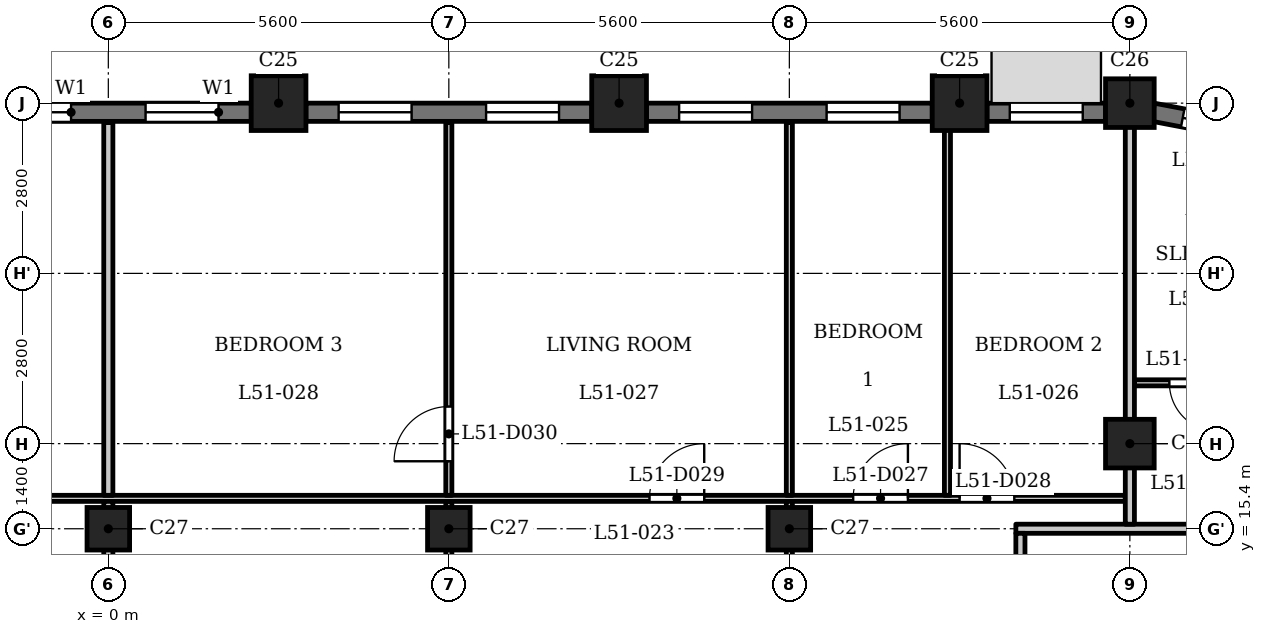
"""IFC4 building model, lengths in metres.
Left out: names, types, materials, properties, quantities, classifications, styles, units other than length and angle.
Written with IfcOpenShell. Run it as: python <this file> out.ifc"""

import sys

from ifc_helpers import new_model, si_unit, direction, frame, frame_2d, origin, origin_2d, place, context, subcontext, project, spatial, rectangle, extrude, element, fill, save


model = new_model("IFC4")
c1 = context("Model", 3, precision=1e-05, world=origin(), true_north=direction((0.0, 1.0)))
c2 = subcontext(c1, "Body", "Model", "MODEL_VIEW")
j1 = project(units=[si_unit("LENGTHUNIT", "METRE"), si_unit("PLANEANGLEUNIT", "RADIAN")], contexts=[c1])
p1 = place(None, origin())
s1 = spatial("IfcSite", under=j1, at=p1, CompositionType="ELEMENT")
p2 = place(p1, origin())
s2 = spatial("IfcBuilding", under=s1, at=p2, CompositionType="ELEMENT")
p3 = place(p2, frame((0.0, 0.0, 199.4)))
s3 = spatial("IfcBuildingStorey", under=s2, at=p3, CompositionType="ELEMENT", Elevation=199.4)
for number, where, z_axis, x_axis in (
    (1, (14.0, 22.4, 0.0), (0.0, 0.0, 1.0), (1.0, 0.0, 0.0)),
    (2, (8.4, 22.4, 0.0), (0.0, 0.0, 1.0), (1.0, 0.0, 0.0)),
    (3, (2.8, 22.4, 0.0), (0.0, 0.0, 1.0), (1.0, 0.0, 0.0)),
):
    element("IfcColumn", number, at=place(p3, frame(where, z_axis=z_axis, x_axis=x_axis)), inside=s3, PredefinedType="COLUMN", context=c2, shape_type="SweptSolid", body=[
        extrude(rectangle(XDim=0.9, YDim=0.9, at=origin_2d()), origin(), (0.0, 0.0, 1.0), 3.5),
    ])
for number, where, z_axis, x_axis in (
    (4, (16.8, 16.8, 0.0), (0.0, 0.0, 1.0), (1.0, 0.0, 0.0)),
    (5, (16.8, 22.4, 0.0), (0.0, 0.0, 1.0), (1.0, 0.0, 0.0)),
):
    element("IfcColumn", number, at=place(p3, frame(where, z_axis=z_axis, x_axis=x_axis)), inside=s3, PredefinedType="COLUMN", context=c2, shape_type="SweptSolid", body=[
        extrude(rectangle(XDim=0.8, YDim=0.8, at=origin_2d()), origin(), (0.0, 0.0, 1.0), 3.5),
    ])
for number, where, z_axis, x_axis in (
    (6, (0.0, 15.4, 0.0), (0.0, 0.0, 1.0), (1.0, 0.0, 0.0)),
    (7, (5.6, 15.4, 0.0), (0.0, 0.0, 1.0), (1.0, 0.0, 0.0)),
    (8, (11.2, 15.4, 0.0), (0.0, 0.0, 1.0), (1.0, 0.0, 0.0)),
):
    element("IfcColumn", number, at=place(p3, frame(where, z_axis=z_axis, x_axis=x_axis)), inside=s3, PredefinedType="COLUMN", context=c2, shape_type="SweptSolid", body=[
        extrude(rectangle(XDim=0.7, YDim=0.7, at=origin_2d()), origin(), (0.0, 0.0, 1.0), 3.5),
    ])
p4 = place(p3, frame((18.946, 21.914, 0.0), z_axis=(0.0, 0.0, 1.0), x_axis=(-0.98230529033, 0.187286722942, 0.0)))
e9 = element("IfcWall", 9, at=p4, inside=s3, PredefinedType="SOLIDWALL", context=c2, shape_type="SweptSolid", body=[
    extrude(rectangle(XDim=1.799, YDim=0.3, at=frame_2d((0.899, 0.0))), origin(), (0.0, 0.0, 1.0), 2.5),
])
p5 = place(p4, frame((0.5, 0.0, 0.6)))
e10 = element("IfcOpeningElement", 10, at=p5, cuts=e9, PredefinedType="OPENING", context=c2, shape_type="SweptSolid", body=[
    extrude(rectangle(XDim=0.8, YDim=1.55, at=frame_2d((0.4, 0.775))), frame((0.0, 0.16, 0.0), z_axis=(0.0, -1.0, 0.0), x_axis=(1.0, 0.0, 0.0)), (0.0, 0.0, 1.0), 0.32),
])
p6 = place(p3, frame((16.4, 22.25, 0.0), z_axis=(0.0, 0.0, 1.0), x_axis=(-1.0, 0.0, 0.0)))
e11 = element("IfcWall", 11, at=p6, inside=s3, PredefinedType="SOLIDWALL", context=c2, shape_type="SweptSolid", body=[
    extrude(rectangle(XDim=1.95, YDim=0.3, at=frame_2d((0.975, 0.0))), origin(), (0.0, 0.0, 1.0), 2.5),
])
p7 = place(p6, frame((0.375, 0.0, 0.6)))
e12 = element("IfcOpeningElement", 12, at=p7, cuts=e11, PredefinedType="OPENING", context=c2, shape_type="SweptSolid", body=[
    extrude(rectangle(XDim=1.2, YDim=1.55, at=frame_2d((0.6, 0.775))), frame((0.0, 0.16, 0.0), z_axis=(0.0, -1.0, 0.0), x_axis=(1.0, 0.0, 0.0)), (0.0, 0.0, 1.0), 0.32),
])
p8 = place(p3, frame((13.55, 22.25, 0.0), z_axis=(0.0, 0.0, 1.0), x_axis=(-1.0, 0.0, 0.0)))
e13 = element("IfcWall", 13, at=p8, inside=s3, PredefinedType="SOLIDWALL", context=c2, shape_type="SweptSolid", body=[
    extrude(rectangle(XDim=4.7, YDim=0.3, at=frame_2d((2.35, 0.0))), origin(), (0.0, 0.0, 1.0), 2.5),
])
p9 = place(p8, frame((0.538, 0.0, 0.6)))
e14 = element("IfcOpeningElement", 14, at=p9, cuts=e13, PredefinedType="OPENING", context=c2, shape_type="SweptSolid", body=[
    extrude(rectangle(XDim=1.2, YDim=1.55, at=frame_2d((0.6, 0.775))), frame((0.0, 0.16, 0.0), z_axis=(0.0, -1.0, 0.0), x_axis=(1.0, 0.0, 0.0)), (0.0, 0.0, 1.0), 0.32),
])
p10 = place(p8, frame((2.962, 0.0, 0.6)))
e15 = element("IfcOpeningElement", 15, at=p10, cuts=e13, PredefinedType="OPENING", context=c2, shape_type="SweptSolid", body=[
    extrude(rectangle(XDim=1.2, YDim=1.55, at=frame_2d((0.6, 0.775))), frame((0.0, 0.16, 0.0), z_axis=(0.0, -1.0, 0.0), x_axis=(1.0, 0.0, 0.0)), (0.0, 0.0, 1.0), 0.32),
])
p11 = place(p3, frame((7.95, 22.25, 0.0), z_axis=(0.0, 0.0, 1.0), x_axis=(-1.0, 0.0, 0.0)))
e16 = element("IfcWall", 16, at=p11, inside=s3, PredefinedType="SOLIDWALL", context=c2, shape_type="SweptSolid", body=[
    extrude(rectangle(XDim=4.7, YDim=0.3, at=frame_2d((2.35, 0.0))), origin(), (0.0, 0.0, 1.0), 2.5),
])
p12 = place(p11, frame((0.538, 0.0, 0.6)))
e17 = element("IfcOpeningElement", 17, at=p12, cuts=e16, PredefinedType="OPENING", context=c2, shape_type="SweptSolid", body=[
    extrude(rectangle(XDim=1.2, YDim=1.55, at=frame_2d((0.6, 0.775))), frame((0.0, 0.16, 0.0), z_axis=(0.0, -1.0, 0.0), x_axis=(1.0, 0.0, 0.0)), (0.0, 0.0, 1.0), 0.32),
])
p13 = place(p11, frame((2.962, 0.0, 0.6)))
e18 = element("IfcOpeningElement", 18, at=p13, cuts=e16, PredefinedType="OPENING", context=c2, shape_type="SweptSolid", body=[
    extrude(rectangle(XDim=1.2, YDim=1.55, at=frame_2d((0.6, 0.775))), frame((0.0, 0.16, 0.0), z_axis=(0.0, -1.0, 0.0), x_axis=(1.0, 0.0, 0.0)), (0.0, 0.0, 1.0), 0.32),
])
p14 = place(p3, frame((2.35, 22.25, 0.0), z_axis=(0.0, 0.0, 1.0), x_axis=(-1.0, 0.0, 0.0)))
e19 = element("IfcWall", 19, at=p14, inside=s3, PredefinedType="SOLIDWALL", context=c2, shape_type="SweptSolid", body=[
    extrude(rectangle(XDim=4.7, YDim=0.3, at=frame_2d((2.35, 0.0))), origin(), (0.0, 0.0, 1.0), 2.5),
])
p15 = place(p14, frame((0.538, 0.0, 0.6)))
e20 = element("IfcOpeningElement", 20, at=p15, cuts=e19, PredefinedType="OPENING", context=c2, shape_type="SweptSolid", body=[
    extrude(rectangle(XDim=1.2, YDim=1.55, at=frame_2d((0.6, 0.775))), frame((0.0, 0.16, 0.0), z_axis=(0.0, -1.0, 0.0), x_axis=(1.0, 0.0, 0.0)), (0.0, 0.0, 1.0), 0.32),
])
p16 = place(p14, frame((2.962, 0.0, 0.6)))
e21 = element("IfcOpeningElement", 21, at=p16, cuts=e19, PredefinedType="OPENING", context=c2, shape_type="SweptSolid", body=[
    extrude(rectangle(XDim=1.2, YDim=1.55, at=frame_2d((0.6, 0.775))), frame((0.0, 0.16, 0.0), z_axis=(0.0, -1.0, 0.0), x_axis=(1.0, 0.0, 0.0)), (0.0, 0.0, 1.0), 0.32),
])
p17 = place(p3, frame((14.925, 15.4, 0.0), z_axis=(0.0, 0.0, 1.0), x_axis=(1.0, 0.0, 0.0)))
e22 = element("IfcWall", 22, at=p17, inside=s3, PredefinedType="PARTITIONING", context=c2, shape_type="SweptSolid", body=[
    extrude(rectangle(XDim=9.759, YDim=0.15, at=frame_2d((4.879, 0.0))), origin(), (0.0, 0.0, 1.0), 3.2),
])
p18 = place(p17, frame((7.616, 0.0, 0.0)))
e23 = element("IfcOpeningElement", 23, at=p18, cuts=e22, PredefinedType="OPENING", context=c2, shape_type="SweptSolid", body=[
    extrude(rectangle(XDim=1.0, YDim=2.1, at=frame_2d((0.5, 1.05))), frame((0.0, 0.085, 0.0), z_axis=(0.0, -1.0, 0.0), x_axis=(1.0, 0.0, 0.0)), (0.0, 0.0, 1.0), 0.17),
])
p19 = place(p3, frame((-16.725, 15.9, 0.0), z_axis=(0.0, 0.0, 1.0), x_axis=(1.0, 0.0, 0.0)))
e24 = element("IfcWall", 24, at=p19, inside=s3, PredefinedType="PARTITIONING", context=c2, shape_type="SweptSolid", body=[
    extrude(rectangle(XDim=33.45, YDim=0.1, at=frame_2d((16.725, 0.0))), origin(), (0.0, 0.0, 1.0), 3.2),
])
p20 = place(p19, frame((1.875, 0.0, 0.0)))
e25 = element("IfcOpeningElement", 25, at=p20, cuts=e24, PredefinedType="OPENING", context=c2, shape_type="SweptSolid", body=[
    extrude(rectangle(XDim=0.9, YDim=2.1, at=frame_2d((0.45, 1.05))), frame((0.0, 0.06, 0.0), z_axis=(0.0, -1.0, 0.0), x_axis=(1.0, 0.0, 0.0)), (0.0, 0.0, 1.0), 0.12),
])
p21 = place(p19, frame((3.975, 0.0, 0.0)))
e26 = element("IfcOpeningElement", 26, at=p21, cuts=e24, PredefinedType="OPENING", context=c2, shape_type="SweptSolid", body=[
    extrude(rectangle(XDim=0.9, YDim=2.1, at=frame_2d((0.45, 1.05))), frame((0.0, 0.06, 0.0), z_axis=(0.0, -1.0, 0.0), x_axis=(1.0, 0.0, 0.0)), (0.0, 0.0, 1.0), 0.12),
])
p22 = place(p19, frame((6.825, 0.0, 0.0)))
e27 = element("IfcOpeningElement", 27, at=p22, cuts=e24, PredefinedType="OPENING", context=c2, shape_type="SweptSolid", body=[
    extrude(rectangle(XDim=0.9, YDim=2.1, at=frame_2d((0.45, 1.05))), frame((0.0, 0.06, 0.0), z_axis=(0.0, -1.0, 0.0), x_axis=(1.0, 0.0, 0.0)), (0.0, 0.0, 1.0), 0.12),
])
p23 = place(p19, frame((28.975, 0.0, 0.0)))
e28 = element("IfcOpeningElement", 28, at=p23, cuts=e24, PredefinedType="OPENING", context=c2, shape_type="SweptSolid", body=[
    extrude(rectangle(XDim=0.9, YDim=2.1, at=frame_2d((0.45, 1.05))), frame((0.0, 0.06, 0.0), z_axis=(0.0, -1.0, 0.0), x_axis=(1.0, 0.0, 0.0)), (0.0, 0.0, 1.0), 0.12),
])
p24 = place(p19, frame((30.725, 0.0, 0.0)))
e29 = element("IfcOpeningElement", 29, at=p24, cuts=e24, PredefinedType="OPENING", context=c2, shape_type="SweptSolid", body=[
    extrude(rectangle(XDim=0.9, YDim=2.1, at=frame_2d((0.45, 1.05))), frame((0.0, 0.06, 0.0), z_axis=(0.0, -1.0, 0.0), x_axis=(1.0, 0.0, 0.0)), (0.0, 0.0, 1.0), 0.12),
])
p25 = place(p19, frame((25.625, 0.0, 0.0)))
e30 = element("IfcOpeningElement", 30, at=p25, cuts=e24, PredefinedType="OPENING", context=c2, shape_type="SweptSolid", body=[
    extrude(rectangle(XDim=0.9, YDim=2.1, at=frame_2d((0.45, 1.05))), frame((0.0, 0.06, 0.0), z_axis=(0.0, -1.0, 0.0), x_axis=(1.0, 0.0, 0.0)), (0.0, 0.0, 1.0), 0.12),
])
p26 = place(p3, frame((16.875, 17.8, 0.0), z_axis=(0.0, 0.0, 1.0), x_axis=(1.0, 0.0, 0.0)))
e31 = element("IfcWall", 31, at=p26, inside=s3, PredefinedType="PARTITIONING", context=c2, shape_type="SweptSolid", body=[
    extrude(rectangle(XDim=6.719, YDim=0.1, at=frame_2d((3.359, 0.0))), origin(), (0.0, 0.0, 1.0), 3.2),
])
p27 = place(p26, frame((0.575, 0.0, 0.0)))
e32 = element("IfcOpeningElement", 32, at=p27, cuts=e31, PredefinedType="OPENING", context=c2, shape_type="SweptSolid", body=[
    extrude(rectangle(XDim=0.8, YDim=2.1, at=frame_2d((0.4, 1.05))), frame((0.0, 0.06, 0.0), z_axis=(0.0, -1.0, 0.0), x_axis=(1.0, 0.0, 0.0)), (0.0, 0.0, 1.0), 0.12),
])
p28 = place(p26, frame((4.693, 0.0, 0.0)))
e33 = element("IfcOpeningElement", 33, at=p28, cuts=e31, PredefinedType="OPENING", context=c2, shape_type="SweptSolid", body=[
    extrude(rectangle(XDim=0.9, YDim=2.1, at=frame_2d((0.45, 1.05))), frame((0.0, 0.06, 0.0), z_axis=(0.0, -1.0, 0.0), x_axis=(1.0, 0.0, 0.0)), (0.0, 0.0, 1.0), 0.12),
])
p29 = place(p3, frame((0.0, 13.275, 0.0), z_axis=(0.0, 0.0, 1.0), x_axis=(0.0, 1.0, 0.0)))
e34 = element("IfcWall", 34, at=p29, inside=s3, PredefinedType="PARTITIONING", context=c2, shape_type="SweptSolid", body=[
    extrude(rectangle(XDim=2.575, YDim=0.15, at=frame_2d((1.288, 0.0))), origin(), (0.0, 0.0, 1.0), 3.2),
])
p30 = place(p3, frame((0.0, 15.95, 0.0), z_axis=(0.0, 0.0, 1.0), x_axis=(0.0, 1.0, 0.0)))
e35 = element("IfcWall", 35, at=p30, inside=s3, PredefinedType="PARTITIONING", context=c2, shape_type="SweptSolid", body=[
    extrude(rectangle(XDim=6.13, YDim=0.15, at=frame_2d((3.065, 0.0))), origin(), (0.0, 0.0, 1.0), 3.2),
])
p31 = place(p3, frame((5.6, 13.275, 0.0), z_axis=(0.0, 0.0, 1.0), x_axis=(0.0, 1.0, 0.0)))
e36 = element("IfcWall", 36, at=p31, inside=s3, PredefinedType="PARTITIONING", context=c2, shape_type="SweptSolid", body=[
    extrude(rectangle(XDim=2.575, YDim=0.1, at=frame_2d((1.288, 0.0))), origin(), (0.0, 0.0, 1.0), 3.2),
])
p32 = place(p31, frame((0.425, 0.0, 0.0)))
e37 = element("IfcOpeningElement", 37, at=p32, cuts=e36, PredefinedType="OPENING", context=c2, shape_type="SweptSolid", body=[
    extrude(rectangle(XDim=0.8, YDim=2.1, at=frame_2d((0.4, 1.05))), frame((0.0, 0.06, 0.0), z_axis=(0.0, -1.0, 0.0), x_axis=(1.0, 0.0, 0.0)), (0.0, 0.0, 1.0), 0.12),
])
p33 = place(p3, frame((5.6, 15.95, 0.0), z_axis=(0.0, 0.0, 1.0), x_axis=(0.0, 1.0, 0.0)))
e38 = element("IfcWall", 38, at=p33, inside=s3, PredefinedType="PARTITIONING", context=c2, shape_type="SweptSolid", body=[
    extrude(rectangle(XDim=6.13, YDim=0.1, at=frame_2d((3.065, 0.0))), origin(), (0.0, 0.0, 1.0), 3.2),
])
p34 = place(p33, frame((0.56, 0.0, 0.0)))
e39 = element("IfcOpeningElement", 39, at=p34, cuts=e38, PredefinedType="OPENING", context=c2, shape_type="SweptSolid", body=[
    extrude(rectangle(XDim=0.9, YDim=2.1, at=frame_2d((0.45, 1.05))), frame((0.0, 0.06, 0.0), z_axis=(0.0, -1.0, 0.0), x_axis=(1.0, 0.0, 0.0)), (0.0, 0.0, 1.0), 0.12),
])
p35 = place(p3, frame((11.2, 13.275, 0.0), z_axis=(0.0, 0.0, 1.0), x_axis=(0.0, 1.0, 0.0)))
e40 = element("IfcWall", 40, at=p35, inside=s3, PredefinedType="PARTITIONING", context=c2, shape_type="SweptSolid", body=[
    extrude(rectangle(XDim=2.575, YDim=0.1, at=frame_2d((1.288, 0.0))), origin(), (0.0, 0.0, 1.0), 3.2),
])
p36 = place(p35, frame((0.575, 0.0, 0.0)))
e41 = element("IfcOpeningElement", 41, at=p36, cuts=e40, PredefinedType="OPENING", context=c2, shape_type="SweptSolid", body=[
    extrude(rectangle(XDim=0.9, YDim=2.1, at=frame_2d((0.45, 1.05))), frame((0.0, 0.06, 0.0), z_axis=(0.0, -1.0, 0.0), x_axis=(1.0, 0.0, 0.0)), (0.0, 0.0, 1.0), 0.12),
])
p37 = place(p3, frame((11.2, 15.95, 0.0), z_axis=(0.0, 0.0, 1.0), x_axis=(0.0, 1.0, 0.0)))
e42 = element("IfcWall", 42, at=p37, inside=s3, PredefinedType="PARTITIONING", context=c2, shape_type="SweptSolid", body=[
    extrude(rectangle(XDim=6.13, YDim=0.1, at=frame_2d((3.065, 0.0))), origin(), (0.0, 0.0, 1.0), 3.2),
])
p38 = place(p3, frame((13.8, 15.95, 0.0), z_axis=(0.0, 0.0, 1.0), x_axis=(0.0, 1.0, 0.0)))
e43 = element("IfcWall", 43, at=p38, inside=s3, PredefinedType="PARTITIONING", context=c2, shape_type="SweptSolid", body=[
    extrude(rectangle(XDim=6.88, YDim=0.1, at=frame_2d((3.44, 0.0))), origin(), (0.0, 0.0, 1.0), 3.2),
])
p39 = place(p3, frame((15.0, 13.275, 0.0), z_axis=(0.0, 0.0, 1.0), x_axis=(0.0, 1.0, 0.0)))
e44 = element("IfcWall", 44, at=p39, inside=s3, PredefinedType="PARTITIONING", context=c2, shape_type="SweptSolid", body=[
    extrude(rectangle(XDim=2.05, YDim=0.15, at=frame_2d((1.025, 0.0))), origin(), (0.0, 0.0, 1.0), 3.2),
])
p40 = place(p39, frame((0.476, 0.0, 0.0)))
e45 = element("IfcOpeningElement", 45, at=p40, cuts=e44, PredefinedType="OPENING", context=c2, shape_type="SweptSolid", body=[
    extrude(rectangle(XDim=1.0, YDim=2.1, at=frame_2d((0.5, 1.05))), frame((0.0, 0.085, 0.0), z_axis=(0.0, -1.0, 0.0), x_axis=(1.0, 0.0, 0.0)), (0.0, 0.0, 1.0), 0.17),
])
p41 = place(p3, frame((16.8, 15.475, 0.0), z_axis=(0.0, 0.0, 1.0), x_axis=(0.0, 1.0, 0.0)))
e46 = element("IfcWall", 46, at=p41, inside=s3, PredefinedType="PARTITIONING", context=c2, shape_type="SweptSolid", body=[
    extrude(rectangle(XDim=6.835, YDim=0.15, at=frame_2d((3.417, 0.0))), origin(), (0.0, 0.0, 1.0), 2.55),
])
p42 = place(p23, origin())
e47 = element("IfcDoor", 47, at=p42, inside=s3, OperationType="SINGLE_SWING_LEFT", PredefinedType="DOOR", context=c2, shape_type="SweptSolid", body=[
    extrude(rectangle(XDim=0.9, YDim=2.1, at=frame_2d((0.45, 1.05))), frame((0.0, 0.025, 0.0), z_axis=(0.0, -1.0, 0.0), x_axis=(1.0, 0.0, 0.0)), (0.0, 0.0, 1.0), 0.05),
])
fill(e28, e47)
p43 = place(p24, origin())
e48 = element("IfcDoor", 48, at=p43, inside=s3, OperationType="SINGLE_SWING_RIGHT", PredefinedType="DOOR", context=c2, shape_type="SweptSolid", body=[
    extrude(rectangle(XDim=0.9, YDim=2.1, at=frame_2d((0.45, 1.05))), frame((0.0, 0.025, 0.0), z_axis=(0.0, -1.0, 0.0), x_axis=(1.0, 0.0, 0.0)), (0.0, 0.0, 1.0), 0.05),
])
fill(e29, e48)
p44 = place(p25, origin())
e49 = element("IfcDoor", 49, at=p44, inside=s3, OperationType="SINGLE_SWING_LEFT", PredefinedType="DOOR", context=c2, shape_type="SweptSolid", body=[
    extrude(rectangle(XDim=0.9, YDim=2.1, at=frame_2d((0.45, 1.05))), frame((0.0, 0.025, 0.0), z_axis=(0.0, -1.0, 0.0), x_axis=(1.0, 0.0, 0.0)), (0.0, 0.0, 1.0), 0.05),
])
fill(e30, e49)
p45 = place(p34, origin())
e50 = element("IfcDoor", 50, at=p45, inside=s3, OperationType="SINGLE_SWING_RIGHT", PredefinedType="DOOR", context=c2, shape_type="SweptSolid", body=[
    extrude(rectangle(XDim=0.9, YDim=2.1, at=frame_2d((0.45, 1.05))), frame((0.0, 0.025, 0.0), z_axis=(0.0, -1.0, 0.0), x_axis=(1.0, 0.0, 0.0)), (0.0, 0.0, 1.0), 0.05),
])
fill(e39, e50)
p46 = place(p27, origin())
e51 = element("IfcDoor", 51, at=p46, inside=s3, OperationType="SINGLE_SWING_RIGHT", PredefinedType="DOOR", context=c2, shape_type="SweptSolid", body=[
    extrude(rectangle(XDim=0.8, YDim=2.1, at=frame_2d((0.4, 1.05))), frame((0.0, 0.025, 0.0), z_axis=(0.0, -1.0, 0.0), x_axis=(1.0, 0.0, 0.0)), (0.0, 0.0, 1.0), 0.05),
])
fill(e32, e51)
p47 = place(p5, origin())
e52 = element("IfcWindow", 52, at=p47, inside=s3, PartitioningType="SINGLE_PANEL", PredefinedType="WINDOW", context=c2, shape_type="SweptSolid", body=[
    extrude(rectangle(XDim=0.8, YDim=1.55, at=frame_2d((0.4, 0.775))), frame((0.0, 0.03, 0.0), z_axis=(0.0, -1.0, 0.0), x_axis=(1.0, 0.0, 0.0)), (0.0, 0.0, 1.0), 0.06),
])
fill(e10, e52)
p48 = place(p7, origin())
e53 = element("IfcWindow", 53, at=p48, inside=s3, PartitioningType="SINGLE_PANEL", PredefinedType="WINDOW", context=c2, shape_type="SweptSolid", body=[
    extrude(rectangle(XDim=1.2, YDim=1.55, at=frame_2d((0.6, 0.775))), frame((0.0, 0.03, 0.0), z_axis=(0.0, -1.0, 0.0), x_axis=(1.0, 0.0, 0.0)), (0.0, 0.0, 1.0), 0.06),
])
fill(e12, e53)
p49 = place(p9, origin())
e54 = element("IfcWindow", 54, at=p49, inside=s3, PartitioningType="SINGLE_PANEL", PredefinedType="WINDOW", context=c2, shape_type="SweptSolid", body=[
    extrude(rectangle(XDim=1.2, YDim=1.55, at=frame_2d((0.6, 0.775))), frame((0.0, 0.03, 0.0), z_axis=(0.0, -1.0, 0.0), x_axis=(1.0, 0.0, 0.0)), (0.0, 0.0, 1.0), 0.06),
])
fill(e14, e54)
p50 = place(p10, origin())
e55 = element("IfcWindow", 55, at=p50, inside=s3, PartitioningType="SINGLE_PANEL", PredefinedType="WINDOW", context=c2, shape_type="SweptSolid", body=[
    extrude(rectangle(XDim=1.2, YDim=1.55, at=frame_2d((0.6, 0.775))), frame((0.0, 0.03, 0.0), z_axis=(0.0, -1.0, 0.0), x_axis=(1.0, 0.0, 0.0)), (0.0, 0.0, 1.0), 0.06),
])
fill(e15, e55)
p51 = place(p12, origin())
e56 = element("IfcWindow", 56, at=p51, inside=s3, PartitioningType="SINGLE_PANEL", PredefinedType="WINDOW", context=c2, shape_type="SweptSolid", body=[
    extrude(rectangle(XDim=1.2, YDim=1.55, at=frame_2d((0.6, 0.775))), frame((0.0, 0.03, 0.0), z_axis=(0.0, -1.0, 0.0), x_axis=(1.0, 0.0, 0.0)), (0.0, 0.0, 1.0), 0.06),
])
fill(e17, e56)
p52 = place(p13, origin())
e57 = element("IfcWindow", 57, at=p52, inside=s3, PartitioningType="SINGLE_PANEL", PredefinedType="WINDOW", context=c2, shape_type="SweptSolid", body=[
    extrude(rectangle(XDim=1.2, YDim=1.55, at=frame_2d((0.6, 0.775))), frame((0.0, 0.03, 0.0), z_axis=(0.0, -1.0, 0.0), x_axis=(1.0, 0.0, 0.0)), (0.0, 0.0, 1.0), 0.06),
])
fill(e18, e57)
p53 = place(p15, origin())
e58 = element("IfcWindow", 58, at=p53, inside=s3, PartitioningType="SINGLE_PANEL", PredefinedType="WINDOW", context=c2, shape_type="SweptSolid", body=[
    extrude(rectangle(XDim=1.2, YDim=1.55, at=frame_2d((0.6, 0.775))), frame((0.0, 0.03, 0.0), z_axis=(0.0, -1.0, 0.0), x_axis=(1.0, 0.0, 0.0)), (0.0, 0.0, 1.0), 0.06),
])
fill(e20, e58)
p54 = place(p16, origin())
e59 = element("IfcWindow", 59, at=p54, inside=s3, PartitioningType="SINGLE_PANEL", PredefinedType="WINDOW", context=c2, shape_type="SweptSolid", body=[
    extrude(rectangle(XDim=1.2, YDim=1.55, at=frame_2d((0.6, 0.775))), frame((0.0, 0.03, 0.0), z_axis=(0.0, -1.0, 0.0), x_axis=(1.0, 0.0, 0.0)), (0.0, 0.0, 1.0), 0.06),
])
fill(e21, e59)
save(model, sys.argv[1])
